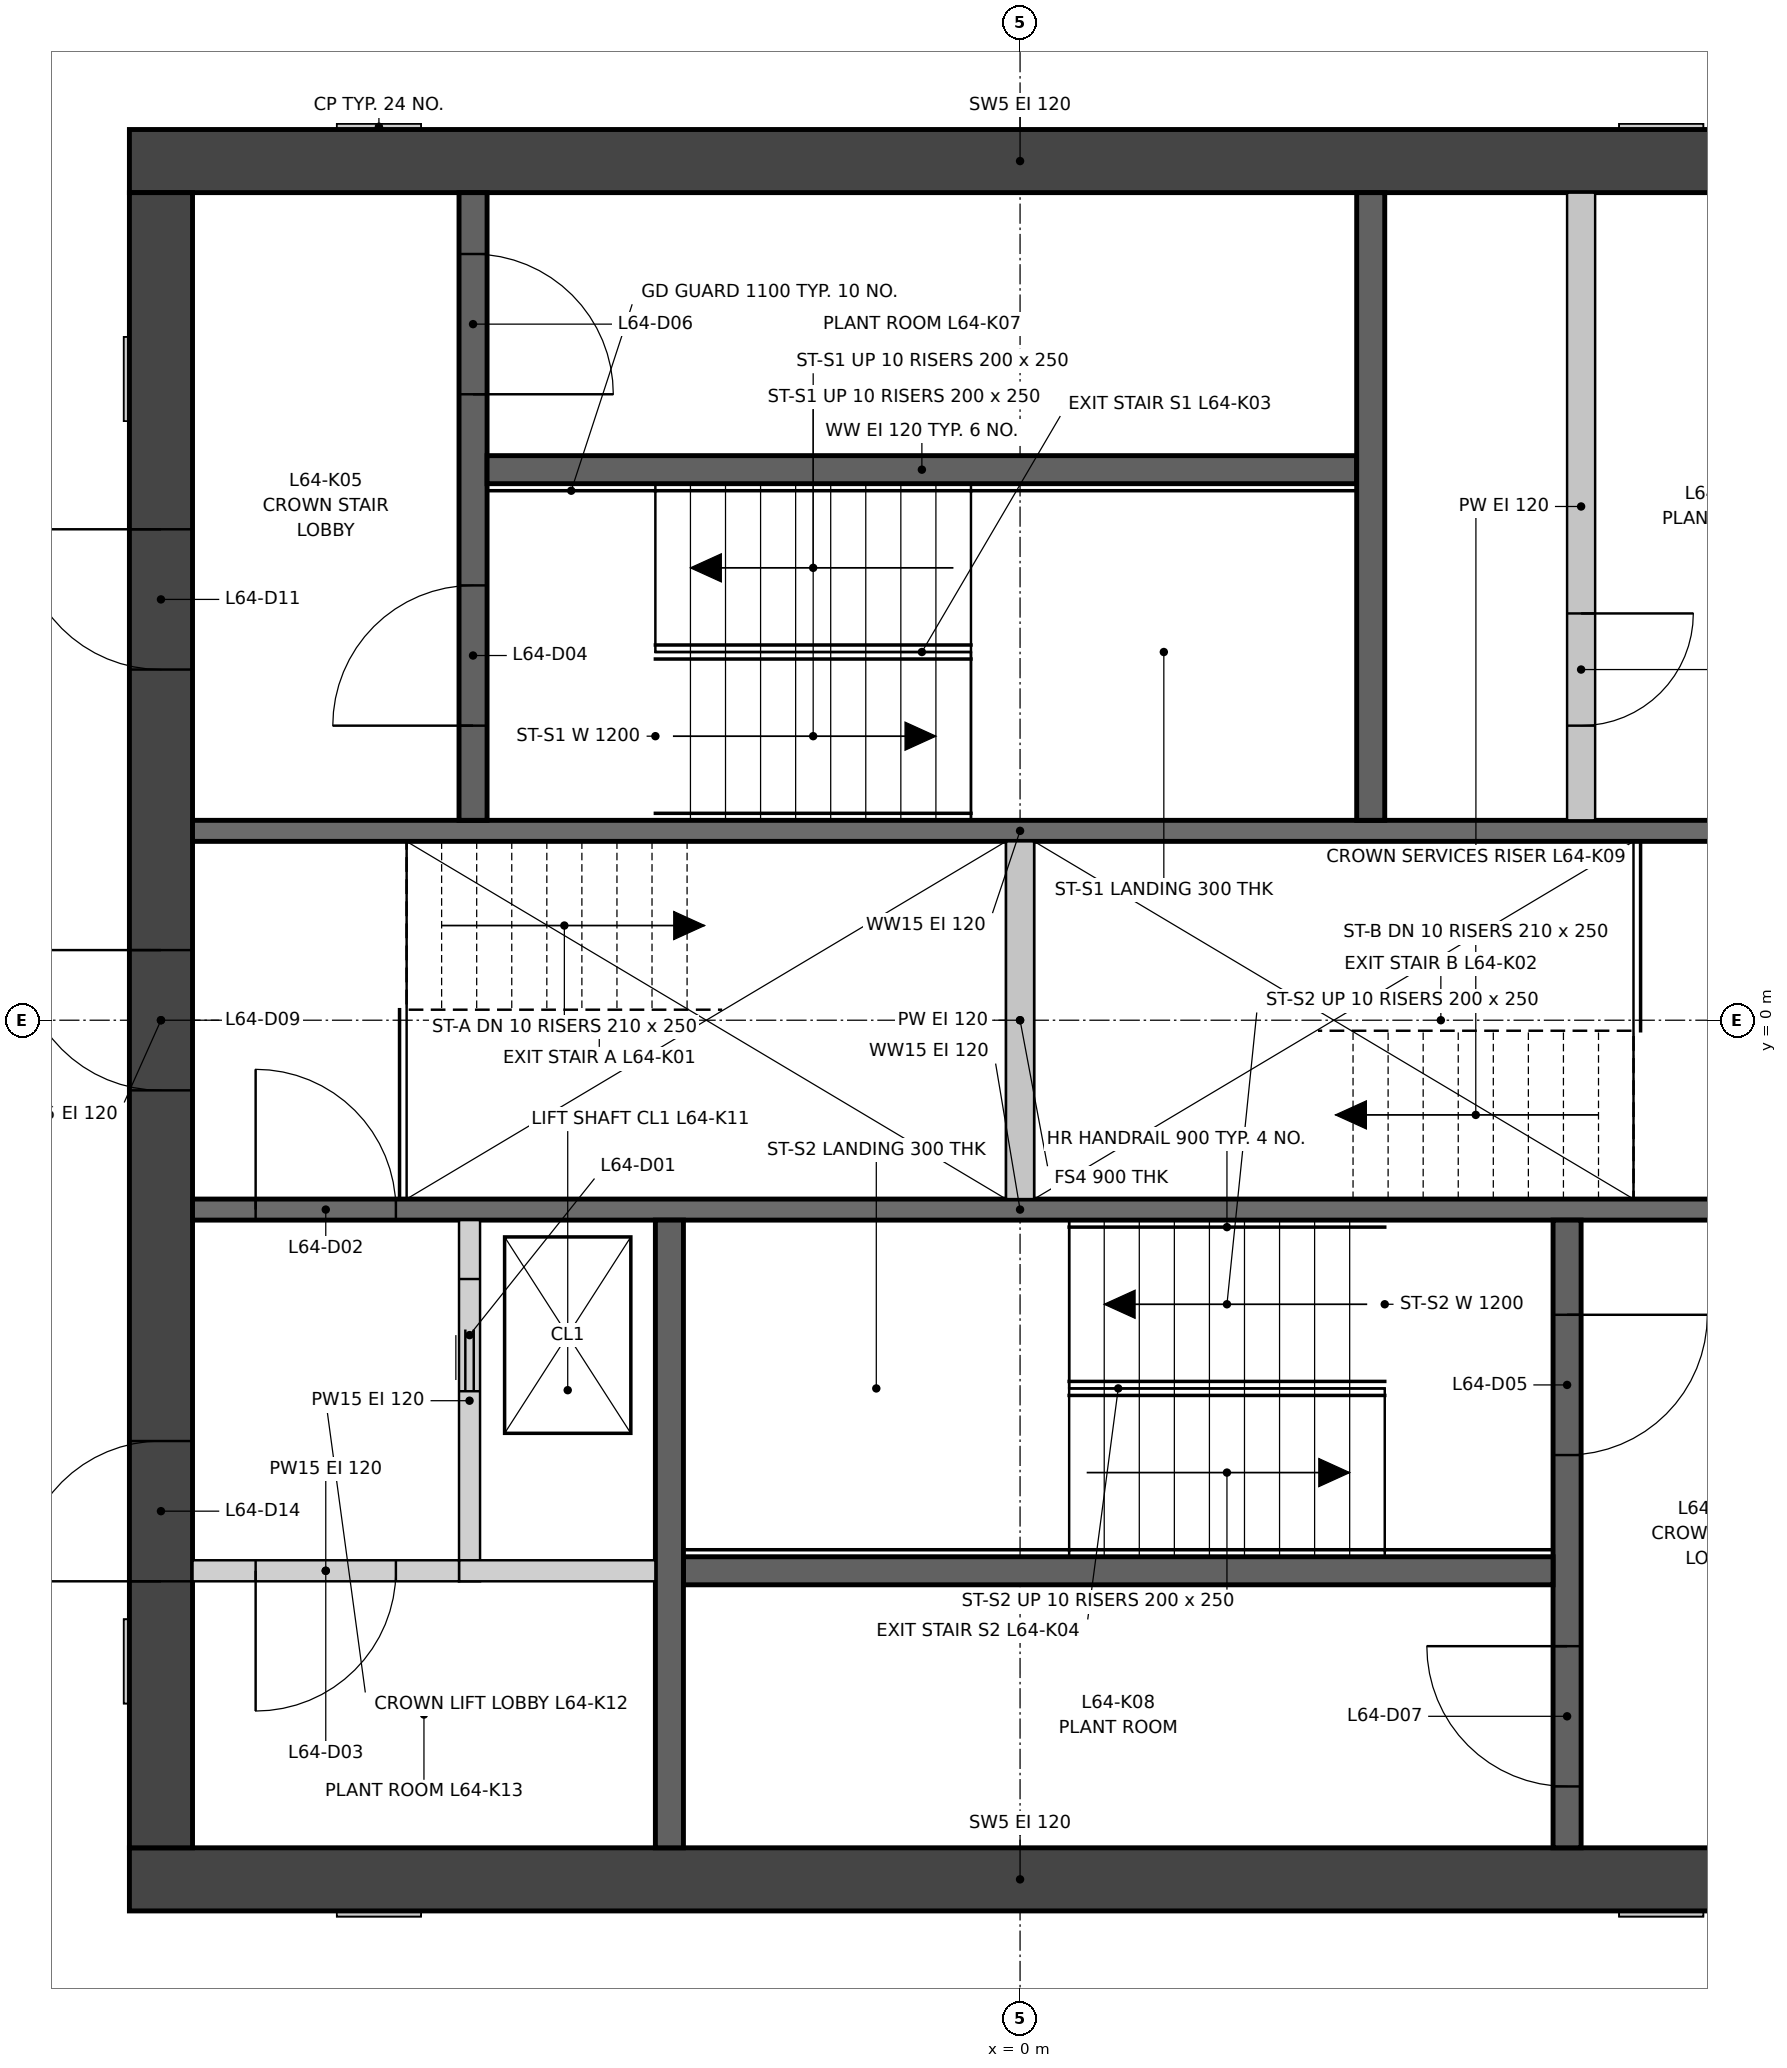
"""IFC4 building model, lengths in metres.
Left out: names, types, materials, properties, quantities, classifications, styles, units other than length and angle.
Written with IfcOpenShell. Run it as: python <this file> out.ifc"""

import sys

from ifc_helpers import new_model, si_unit, direction, frame, frame_2d, origin, place, context, subcontext, project, spatial, rectangle, extrude, element, fill, save


model = new_model("IFC4")
c1 = context("Model", 3, precision=1e-05, world=origin(), true_north=direction((0.0, 1.0)))
c2 = subcontext(c1, "Body", "Model", "MODEL_VIEW")
j1 = project(units=[si_unit("LENGTHUNIT", "METRE"), si_unit("PLANEANGLEUNIT", "RADIAN")], contexts=[c1])
p1 = place(None, origin())
s1 = spatial("IfcSite", under=j1, at=p1, CompositionType="ELEMENT")
p2 = place(p1, origin())
s2 = spatial("IfcBuilding", under=s1, at=p2, CompositionType="ELEMENT")
p3 = place(p2, frame((0.0, 0.0, 235.4)))
s3 = spatial("IfcBuildingStorey", under=s2, at=p3, CompositionType="ELEMENT", Elevation=235.4)
for number, where, z_axis, x_axis in (
    (1, (-6.35, -6.125, 0.0), (0.0, 0.0, 1.0), (1.0, 0.0, 0.0)),
    (2, (-6.35, 6.125, 0.0), (0.0, 0.0, 1.0), (1.0, 0.0, 0.0)),
):
    element("IfcWall", number, at=place(p3, frame(where, z_axis=z_axis, x_axis=x_axis)), inside=s3, PredefinedType="SHEAR", context=c2, shape_type="SweptSolid", body=[
        extrude(rectangle(XDim=12.7, YDim=0.45, at=frame_2d((6.35, 0.0))), origin(), (0.0, 0.0, 1.0), 3.4),
    ])
p4 = place(p3, frame((-6.125, -5.9, 0.0), z_axis=(0.0, 0.0, 1.0), x_axis=(0.0, 1.0, 0.0)))
e3 = element("IfcWall", 3, at=p4, inside=s3, PredefinedType="SHEAR", context=c2, shape_type="SweptSolid", body=[
    extrude(rectangle(XDim=11.8, YDim=0.45, at=frame_2d((5.9, 0.0))), origin(), (0.0, 0.0, 1.0), 3.4),
])
p5 = place(p4, frame((5.4, 0.0, 0.0)))
e4 = element("IfcOpeningElement", 4, at=p5, cuts=e3, PredefinedType="OPENING", context=c2, shape_type="SweptSolid", body=[
    extrude(rectangle(XDim=1.0, YDim=2.1, at=frame_2d((0.5, 1.05))), frame((0.0, 0.235, 0.0), z_axis=(0.0, -1.0, 0.0), x_axis=(1.0, 0.0, 0.0)), (0.0, 0.0, 1.0), 0.47),
])
p6 = place(p4, frame((8.4, 0.0, 0.0)))
e5 = element("IfcOpeningElement", 5, at=p6, cuts=e3, PredefinedType="OPENING", context=c2, shape_type="SweptSolid", body=[
    extrude(rectangle(XDim=1.0, YDim=2.1, at=frame_2d((0.5, 1.05))), frame((0.0, 0.235, 0.0), z_axis=(0.0, -1.0, 0.0), x_axis=(1.0, 0.0, 0.0)), (0.0, 0.0, 1.0), 0.47),
])
p7 = place(p4, frame((1.9, 0.0, 0.0)))
e6 = element("IfcOpeningElement", 6, at=p7, cuts=e3, PredefinedType="OPENING", context=c2, shape_type="SweptSolid", body=[
    extrude(rectangle(XDim=1.0, YDim=2.1, at=frame_2d((0.5, 1.05))), frame((0.0, 0.235, 0.0), z_axis=(0.0, -1.0, 0.0), x_axis=(1.0, 0.0, 0.0)), (0.0, 0.0, 1.0), 0.47),
])
p8 = place(p3, frame((-5.9, -1.35, 0.0), z_axis=(0.0, 0.0, 1.0), x_axis=(1.0, 0.0, 0.0)))
e7 = element("IfcWall", 7, at=p8, inside=s3, PredefinedType="SHEAR", context=c2, shape_type="SweptSolid", body=[
    extrude(rectangle(XDim=11.8, YDim=0.15, at=frame_2d((5.9, 0.0))), origin(), (0.0, 0.0, 1.0), 3.4),
])
p9 = place(p8, frame((0.45, 0.0, 0.0)))
e8 = element("IfcOpeningElement", 8, at=p9, cuts=e7, PredefinedType="OPENING", context=c2, shape_type="SweptSolid", body=[
    extrude(rectangle(XDim=1.0, YDim=2.1, at=frame_2d((0.5, 1.05))), frame((0.0, 0.085, 0.0), z_axis=(0.0, -1.0, 0.0), x_axis=(1.0, 0.0, 0.0)), (0.0, 0.0, 1.0), 0.17),
])
p10 = place(p3, frame((-5.9, 1.35, 0.0), z_axis=(0.0, 0.0, 1.0), x_axis=(1.0, 0.0, 0.0)))
e9 = element("IfcWall", 9, at=p10, inside=s3, PredefinedType="SHEAR", context=c2, shape_type="SweptSolid", body=[
    extrude(rectangle(XDim=11.8, YDim=0.15, at=frame_2d((5.9, 0.0))), origin(), (0.0, 0.0, 1.0), 3.4),
])
p11 = place(p3, frame((0.0, -1.275, 0.0), z_axis=(0.0, 0.0, 1.0), x_axis=(0.0, 1.0, 0.0)))
e10 = element("IfcWall", 10, at=p11, inside=s3, PredefinedType="PARTITIONING", context=c2, shape_type="SweptSolid", body=[
    extrude(rectangle(XDim=2.55, YDim=0.2, at=frame_2d((1.275, 0.0))), origin(), (0.0, 0.0, 1.0), 3.4),
])
p12 = place(p3, frame((-3.9, 1.425, 0.0), z_axis=(0.0, 0.0, 1.0), x_axis=(0.0, 1.0, 0.0)))
e11 = element("IfcWall", 11, at=p12, inside=s3, PredefinedType="SHEAR", context=c2, shape_type="SweptSolid", body=[
    extrude(rectangle(XDim=4.475, YDim=0.2, at=frame_2d((2.237, 0.0))), origin(), (0.0, 0.0, 1.0), 3.4),
])
p13 = place(p12, frame((0.675, 0.0, 0.0)))
e12 = element("IfcOpeningElement", 12, at=p13, cuts=e11, PredefinedType="OPENING", context=c2, shape_type="SweptSolid", body=[
    extrude(rectangle(XDim=1.0, YDim=2.1, at=frame_2d((0.5, 1.05))), frame((0.0, 0.11, 0.0), z_axis=(0.0, -1.0, 0.0), x_axis=(1.0, 0.0, 0.0)), (0.0, 0.0, 1.0), 0.22),
])
p14 = place(p12, frame((3.038, 0.0, 0.0)))
e13 = element("IfcOpeningElement", 13, at=p14, cuts=e11, PredefinedType="OPENING", context=c2, shape_type="SweptSolid", body=[
    extrude(rectangle(XDim=1.0, YDim=2.1, at=frame_2d((0.5, 1.05))), frame((0.0, 0.11, 0.0), z_axis=(0.0, -1.0, 0.0), x_axis=(1.0, 0.0, 0.0)), (0.0, 0.0, 1.0), 0.22),
])
p15 = place(p3, frame((-3.8, 3.925, 0.0), z_axis=(0.0, 0.0, 1.0), x_axis=(1.0, 0.0, 0.0)))
e14 = element("IfcWall", 14, at=p15, inside=s3, PredefinedType="SHEAR", context=c2, shape_type="SweptSolid", body=[
    extrude(rectangle(XDim=6.2, YDim=0.2, at=frame_2d((3.1, 0.0))), origin(), (0.0, 0.0, 1.0), 3.4),
])
p16 = place(p3, frame((2.5, 1.425, 0.0), z_axis=(0.0, 0.0, 1.0), x_axis=(0.0, 1.0, 0.0)))
e15 = element("IfcWall", 15, at=p16, inside=s3, PredefinedType="SHEAR", context=c2, shape_type="SweptSolid", body=[
    extrude(rectangle(XDim=4.475, YDim=0.2, at=frame_2d((2.237, 0.0))), origin(), (0.0, 0.0, 1.0), 3.4),
])
p17 = place(p3, frame((3.9, -1.425, 0.0), z_axis=(0.0, 0.0, 1.0), x_axis=(0.0, -1.0, 0.0)))
e16 = element("IfcWall", 16, at=p17, inside=s3, PredefinedType="SHEAR", context=c2, shape_type="SweptSolid", body=[
    extrude(rectangle(XDim=4.475, YDim=0.2, at=frame_2d((2.237, 0.0))), origin(), (0.0, 0.0, 1.0), 3.4),
])
p18 = place(p17, frame((0.675, 0.0, 0.0)))
e17 = element("IfcOpeningElement", 17, at=p18, cuts=e16, PredefinedType="OPENING", context=c2, shape_type="SweptSolid", body=[
    extrude(rectangle(XDim=1.0, YDim=2.1, at=frame_2d((0.5, 1.05))), frame((0.0, 0.11, 0.0), z_axis=(0.0, -1.0, 0.0), x_axis=(1.0, 0.0, 0.0)), (0.0, 0.0, 1.0), 0.22),
])
p19 = place(p17, frame((3.038, 0.0, 0.0)))
e18 = element("IfcOpeningElement", 18, at=p19, cuts=e16, PredefinedType="OPENING", context=c2, shape_type="SweptSolid", body=[
    extrude(rectangle(XDim=1.0, YDim=2.1, at=frame_2d((0.5, 1.05))), frame((0.0, 0.11, 0.0), z_axis=(0.0, -1.0, 0.0), x_axis=(1.0, 0.0, 0.0)), (0.0, 0.0, 1.0), 0.22),
])
p20 = place(p3, frame((3.8, -3.925, 0.0), z_axis=(0.0, 0.0, 1.0), x_axis=(-1.0, 0.0, 0.0)))
e19 = element("IfcWall", 19, at=p20, inside=s3, PredefinedType="SHEAR", context=c2, shape_type="SweptSolid", body=[
    extrude(rectangle(XDim=6.2, YDim=0.2, at=frame_2d((3.1, 0.0))), origin(), (0.0, 0.0, 1.0), 3.4),
])
p21 = place(p3, frame((-2.5, -1.425, 0.0), z_axis=(0.0, 0.0, 1.0), x_axis=(0.0, -1.0, 0.0)))
e20 = element("IfcWall", 20, at=p21, inside=s3, PredefinedType="SHEAR", context=c2, shape_type="SweptSolid", body=[
    extrude(rectangle(XDim=4.475, YDim=0.2, at=frame_2d((2.237, 0.0))), origin(), (0.0, 0.0, 1.0), 3.4),
])
p22 = place(p3, frame((4.0, 1.425, 0.0), z_axis=(0.0, 0.0, 1.0), x_axis=(0.0, 1.0, 0.0)))
e21 = element("IfcWall", 21, at=p22, inside=s3, PredefinedType="PARTITIONING", context=c2, shape_type="SweptSolid", body=[
    extrude(rectangle(XDim=4.475, YDim=0.2, at=frame_2d((2.237, 0.0))), origin(), (0.0, 0.0, 1.0), 3.4),
])
p23 = place(p22, frame((0.675, 0.0, 0.0)))
e22 = element("IfcOpeningElement", 22, at=p23, cuts=e21, PredefinedType="OPENING", context=c2, shape_type="SweptSolid", body=[
    extrude(rectangle(XDim=0.8, YDim=2.1, at=frame_2d((0.4, 1.05))), frame((0.0, 0.11, 0.0), z_axis=(0.0, -1.0, 0.0), x_axis=(1.0, 0.0, 0.0)), (0.0, 0.0, 1.0), 0.22),
])
p24 = place(p3, frame((-3.925, -4.0, 0.0), z_axis=(0.0, 0.0, 1.0), x_axis=(0.0, 1.0, 0.0)))
e23 = element("IfcWall", 23, at=p24, inside=s3, PredefinedType="PARTITIONING", context=c2, shape_type="SweptSolid", body=[
    extrude(rectangle(XDim=2.575, YDim=0.15, at=frame_2d((1.288, 0.0))), origin(), (0.0, 0.0, 1.0), 3.4),
])
p25 = place(p24, frame((1.355, 0.0, 0.0)))
e24 = element("IfcOpeningElement", 24, at=p25, cuts=e23, PredefinedType="OPENING", context=c2, shape_type="SweptSolid", body=[
    extrude(rectangle(XDim=0.8, YDim=2.1, at=frame_2d((0.4, 1.05))), frame((0.0, 0.085, 0.0), z_axis=(0.0, -1.0, 0.0), x_axis=(1.0, 0.0, 0.0)), (0.0, 0.0, 1.0), 0.17),
])
p26 = place(p3, frame((-4.0, -3.925, 0.0), z_axis=(0.0, 0.0, 1.0), x_axis=(1.0, 0.0, 0.0)))
e25 = element("IfcWall", 25, at=p26, inside=s3, PredefinedType="PARTITIONING", context=c2, shape_type="SweptSolid", body=[
    extrude(rectangle(XDim=1.4, YDim=0.15, at=frame_2d((0.7, 0.0))), origin(), (0.0, 0.0, 1.0), 3.4),
])
p27 = place(p3, frame((-5.9, -3.925, 0.0), z_axis=(0.0, 0.0, 1.0), x_axis=(1.0, 0.0, 0.0)))
e26 = element("IfcWall", 26, at=p27, inside=s3, PredefinedType="PARTITIONING", context=c2, shape_type="SweptSolid", body=[
    extrude(rectangle(XDim=1.9, YDim=0.15, at=frame_2d((0.95, 0.0))), origin(), (0.0, 0.0, 1.0), 3.4),
])
p28 = place(p27, frame((0.45, 0.0, 0.0)))
e27 = element("IfcOpeningElement", 27, at=p28, cuts=e26, PredefinedType="OPENING", context=c2, shape_type="SweptSolid", body=[
    extrude(rectangle(XDim=1.0, YDim=2.1, at=frame_2d((0.5, 1.05))), frame((0.0, 0.085, 0.0), z_axis=(0.0, -1.0, 0.0), x_axis=(1.0, 0.0, 0.0)), (0.0, 0.0, 1.0), 0.17),
])
p29 = place(p25, origin())
e28 = element("IfcDoor", 28, at=p29, inside=s3, OperationType="DOUBLE_DOOR_SLIDING", PredefinedType="DOOR", context=c2, shape_type="SweptSolid", body=[
    extrude(rectangle(XDim=0.8, YDim=2.1, at=frame_2d((0.4, 1.05))), frame((0.0, 0.025, 0.0), z_axis=(0.0, -1.0, 0.0), x_axis=(1.0, 0.0, 0.0)), (0.0, 0.0, 1.0), 0.05),
])
fill(e24, e28)
p30 = place(p9, origin())
e29 = element("IfcDoor", 29, at=p30, inside=s3, OperationType="SINGLE_SWING_LEFT", PredefinedType="DOOR", context=c2, shape_type="SweptSolid", body=[
    extrude(rectangle(XDim=1.0, YDim=2.1, at=frame_2d((0.5, 1.05))), frame((0.0, 0.025, 0.0), z_axis=(0.0, -1.0, 0.0), x_axis=(1.0, 0.0, 0.0)), (0.0, 0.0, 1.0), 0.05),
])
fill(e8, e29)
p31 = place(p28, frame((1.0, 0.0, 0.0), z_axis=(0.0, 0.0, 1.0), x_axis=(-1.0, 0.0, 0.0)))
e30 = element("IfcDoor", 30, at=p31, inside=s3, OperationType="SINGLE_SWING_LEFT", PredefinedType="DOOR", context=c2, shape_type="SweptSolid", body=[
    extrude(rectangle(XDim=1.0, YDim=2.1, at=frame_2d((0.5, 1.05))), frame((0.0, 0.025, 0.0), z_axis=(0.0, -1.0, 0.0), x_axis=(1.0, 0.0, 0.0)), (0.0, 0.0, 1.0), 0.05),
])
fill(e27, e30)
p32 = place(p13, origin())
e31 = element("IfcDoor", 31, at=p32, inside=s3, OperationType="SINGLE_SWING_LEFT", PredefinedType="DOOR", context=c2, shape_type="SweptSolid", body=[
    extrude(rectangle(XDim=1.0, YDim=2.1, at=frame_2d((0.5, 1.05))), frame((0.0, 0.025, 0.0), z_axis=(0.0, -1.0, 0.0), x_axis=(1.0, 0.0, 0.0)), (0.0, 0.0, 1.0), 0.05),
])
fill(e12, e31)
p33 = place(p18, origin())
e32 = element("IfcDoor", 32, at=p33, inside=s3, OperationType="SINGLE_SWING_LEFT", PredefinedType="DOOR", context=c2, shape_type="SweptSolid", body=[
    extrude(rectangle(XDim=1.0, YDim=2.1, at=frame_2d((0.5, 1.05))), frame((0.0, 0.025, 0.0), z_axis=(0.0, -1.0, 0.0), x_axis=(1.0, 0.0, 0.0)), (0.0, 0.0, 1.0), 0.05),
])
fill(e17, e32)
p34 = place(p14, frame((1.0, 0.0, 0.0), z_axis=(0.0, 0.0, 1.0), x_axis=(-1.0, 0.0, 0.0)))
e33 = element("IfcDoor", 33, at=p34, inside=s3, OperationType="SINGLE_SWING_LEFT", PredefinedType="DOOR", context=c2, shape_type="SweptSolid", body=[
    extrude(rectangle(XDim=1.0, YDim=2.1, at=frame_2d((0.5, 1.05))), frame((0.0, 0.025, 0.0), z_axis=(0.0, -1.0, 0.0), x_axis=(1.0, 0.0, 0.0)), (0.0, 0.0, 1.0), 0.05),
])
fill(e13, e33)
p35 = place(p19, frame((1.0, 0.0, 0.0), z_axis=(0.0, 0.0, 1.0), x_axis=(-1.0, 0.0, 0.0)))
e34 = element("IfcDoor", 34, at=p35, inside=s3, OperationType="SINGLE_SWING_LEFT", PredefinedType="DOOR", context=c2, shape_type="SweptSolid", body=[
    extrude(rectangle(XDim=1.0, YDim=2.1, at=frame_2d((0.5, 1.05))), frame((0.0, 0.025, 0.0), z_axis=(0.0, -1.0, 0.0), x_axis=(1.0, 0.0, 0.0)), (0.0, 0.0, 1.0), 0.05),
])
fill(e18, e34)
p36 = place(p23, frame((0.8, 0.0, 0.0), z_axis=(0.0, 0.0, 1.0), x_axis=(-1.0, 0.0, 0.0)))
e35 = element("IfcDoor", 35, at=p36, inside=s3, OperationType="SINGLE_SWING_RIGHT", PredefinedType="DOOR", context=c2, shape_type="SweptSolid", body=[
    extrude(rectangle(XDim=0.8, YDim=2.1, at=frame_2d((0.4, 1.05))), frame((0.0, 0.025, 0.0), z_axis=(0.0, -1.0, 0.0), x_axis=(1.0, 0.0, 0.0)), (0.0, 0.0, 1.0), 0.05),
])
fill(e22, e35)
p37 = place(p5, origin())
e36 = element("IfcDoor", 36, at=p37, inside=s3, OperationType="SINGLE_SWING_RIGHT", PredefinedType="DOOR", context=c2, shape_type="SweptSolid", body=[
    extrude(rectangle(XDim=1.0, YDim=2.1, at=frame_2d((0.5, 1.05))), frame((0.0, 0.025, 0.0), z_axis=(0.0, -1.0, 0.0), x_axis=(1.0, 0.0, 0.0)), (0.0, 0.0, 1.0), 0.05),
])
fill(e4, e36)
p38 = place(p6, origin())
e37 = element("IfcDoor", 37, at=p38, inside=s3, OperationType="SINGLE_SWING_RIGHT", PredefinedType="DOOR", context=c2, shape_type="SweptSolid", body=[
    extrude(rectangle(XDim=1.0, YDim=2.1, at=frame_2d((0.5, 1.05))), frame((0.0, 0.025, 0.0), z_axis=(0.0, -1.0, 0.0), x_axis=(1.0, 0.0, 0.0)), (0.0, 0.0, 1.0), 0.05),
])
fill(e5, e37)
p39 = place(p7, origin())
e38 = element("IfcDoor", 38, at=p39, inside=s3, OperationType="SINGLE_SWING_LEFT", PredefinedType="DOOR", context=c2, shape_type="SweptSolid", body=[
    extrude(rectangle(XDim=1.0, YDim=2.1, at=frame_2d((0.5, 1.05))), frame((0.0, 0.025, 0.0), z_axis=(0.0, -1.0, 0.0), x_axis=(1.0, 0.0, 0.0)), (0.0, 0.0, 1.0), 0.05),
])
fill(e6, e38)
save(model, sys.argv[1])
